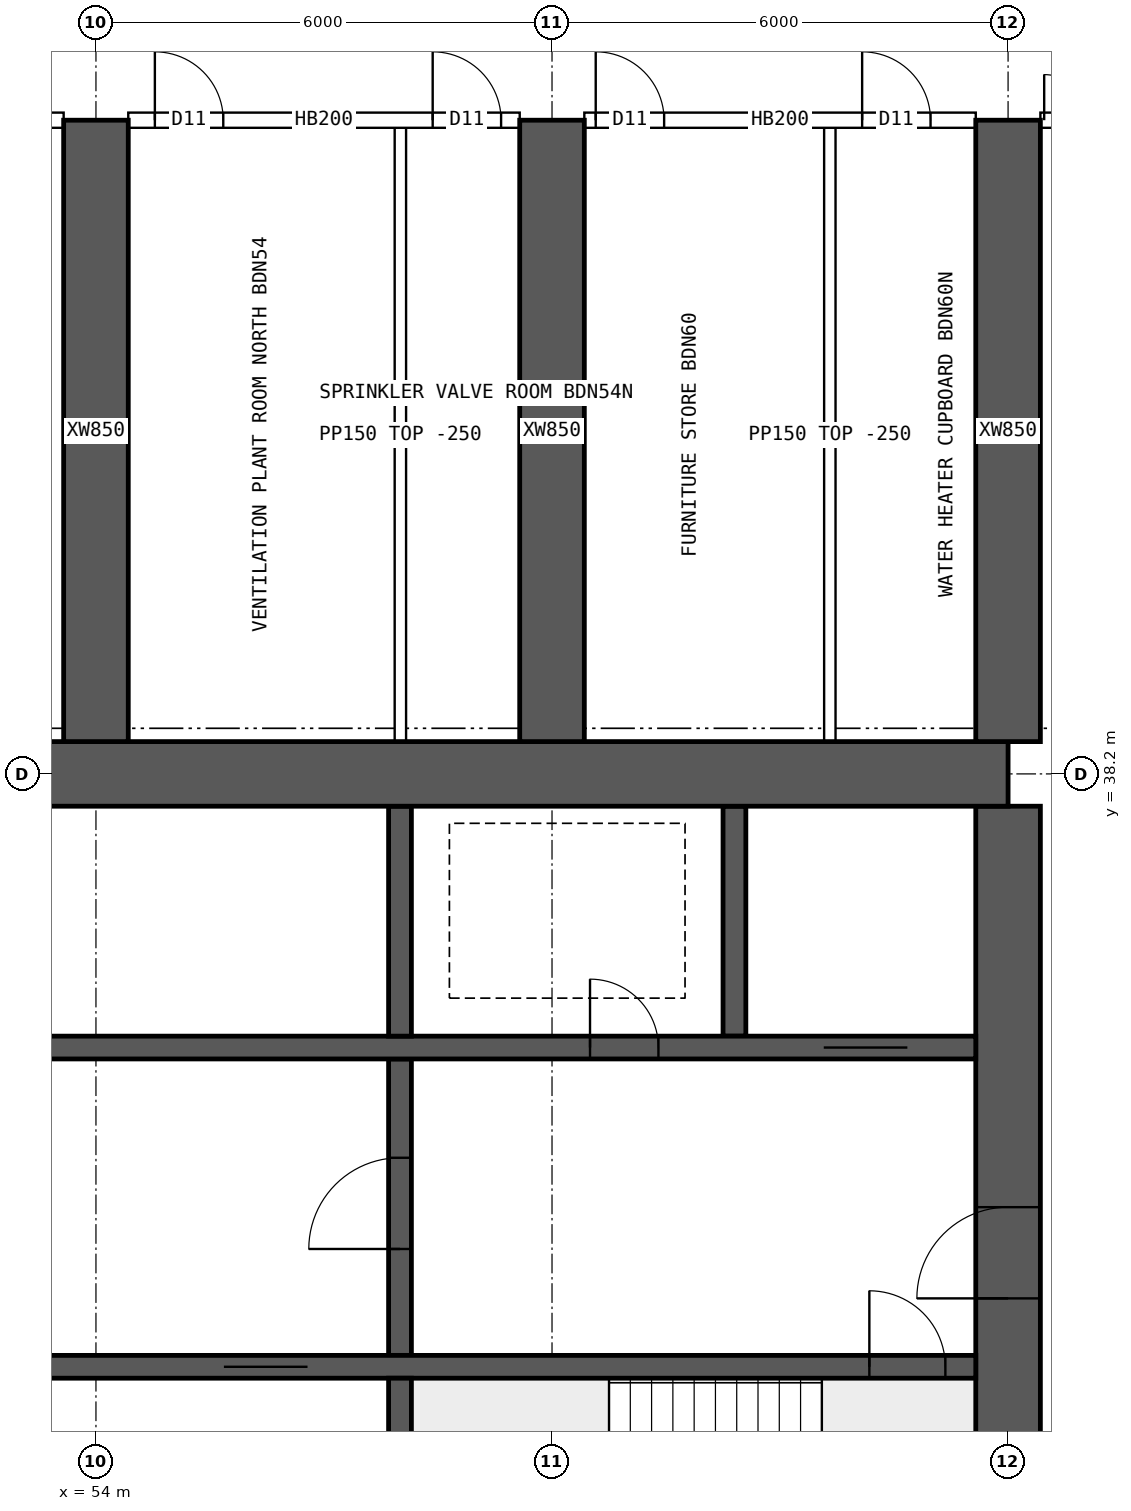
"""IFC4 building model, lengths in metres.
Left out: names, types, materials, properties, quantities, classifications, styles, units other than length and angle.
Written with IfcOpenShell. Run it as: python <this file> out.ifc"""

import sys

from ifc_helpers import new_model, si_unit, direction, frame, frame_2d, origin, place, context, subcontext, project, spatial, rectangle, extrude, element, fill, save


model = new_model("IFC4")
c1 = context("Model", 3, precision=1e-05, world=origin(), true_north=direction((0.0, 1.0)))
c2 = subcontext(c1, "Body", "Model", "MODEL_VIEW")
j1 = project(units=[si_unit("LENGTHUNIT", "METRE"), si_unit("PLANEANGLEUNIT", "RADIAN")], contexts=[c1])
p1 = place(None, origin())
s1 = spatial("IfcSite", under=j1, at=p1, CompositionType="ELEMENT")
p2 = place(p1, origin())
s2 = spatial("IfcBuilding", under=s1, at=p2, CompositionType="ELEMENT")
p3 = place(p2, frame((0.0, 0.0, 178.6)))
s3 = spatial("IfcBuildingStorey", under=s2, at=p3, CompositionType="ELEMENT", Elevation=178.6)
p4 = place(p3, frame((18.0, 38.2, 0.0), z_axis=(0.0, 0.0, 1.0), x_axis=(1.0, 0.0, 0.0)))
e1 = element("IfcWall", 1, at=p4, inside=s3, PredefinedType="SHEAR", context=c2, shape_type="SweptSolid", body=[
    extrude(rectangle(XDim=48.0, YDim=0.85, at=frame_2d((24.0, 0.0))), origin(), (0.0, 0.0, 1.0), 3.75),
])
p5 = place(p3, frame((66.0, 26.225, 0.0), z_axis=(0.0, 0.0, 1.0), x_axis=(0.0, 1.0, 0.0)))
e2 = element("IfcWall", 2, at=p5, inside=s3, PredefinedType="SHEAR", context=c2, shape_type="SweptSolid", body=[
    extrude(rectangle(XDim=11.55, YDim=0.85, at=frame_2d((5.775, 0.0))), origin(), (0.0, 0.0, 1.0), 3.75),
])
p6 = place(p5, frame((5.075, 0.0, 0.0)))
e3 = element("IfcOpeningElement", 3, at=p6, cuts=e2, PredefinedType="OPENING", context=c2, shape_type="SweptSolid", body=[
    extrude(rectangle(XDim=1.2, YDim=2.1, at=frame_2d((0.6, 1.05))), frame((0.0, 0.435, 0.0), z_axis=(0.0, -1.0, 0.0), x_axis=(1.0, 0.0, 0.0)), (0.0, 0.0, 1.0), 0.87),
])
p7 = place(p3, frame((18.425, 30.4, 0.0), z_axis=(0.0, 0.0, 1.0), x_axis=(1.0, 0.0, 0.0)))
e4 = element("IfcWall", 4, at=p7, inside=s3, PredefinedType="SHEAR", context=c2, shape_type="SweptSolid", body=[
    extrude(rectangle(XDim=47.15, YDim=0.3, at=frame_2d((23.575, 0.0))), origin(), (0.0, 0.0, 1.0), 3.75),
])
p8 = place(p7, frame((0.4, 0.0, 0.0)))
e5 = element("IfcOpeningElement", 5, at=p8, cuts=e4, PredefinedType="OPENING", context=c2, shape_type="SweptSolid", body=[
    extrude(rectangle(XDim=1.0, YDim=2.1, at=frame_2d((0.5, 1.05))), frame((0.0, 0.16, 0.0), z_axis=(0.0, -1.0, 0.0), x_axis=(1.0, 0.0, 0.0)), (0.0, 0.0, 1.0), 0.32),
])
p9 = place(p7, frame((45.75, 0.0, 0.0)))
e6 = element("IfcOpeningElement", 6, at=p9, cuts=e4, PredefinedType="OPENING", context=c2, shape_type="SweptSolid", body=[
    extrude(rectangle(XDim=1.0, YDim=2.1, at=frame_2d((0.5, 1.05))), frame((0.0, 0.16, 0.0), z_axis=(0.0, -1.0, 0.0), x_axis=(1.0, 0.0, 0.0)), (0.0, 0.0, 1.0), 0.32),
])
p10 = place(p7, frame((8.325, 0.0, 0.0)))
e7 = element("IfcOpeningElement", 7, at=p10, cuts=e4, PredefinedType="OPENING", context=c2, shape_type="SweptSolid", body=[
    extrude(rectangle(XDim=1.1, YDim=2.1, at=frame_2d((0.55, 1.05))), frame((0.0, 0.16, 0.0), z_axis=(0.0, -1.0, 0.0), x_axis=(1.0, 0.0, 0.0)), (0.0, 0.0, 1.0), 0.32),
])
p11 = place(p7, frame((10.925, 0.0, 0.0)))
e8 = element("IfcOpeningElement", 8, at=p11, cuts=e4, PredefinedType="OPENING", context=c2, shape_type="SweptSolid", body=[
    extrude(rectangle(XDim=1.1, YDim=2.1, at=frame_2d((0.55, 1.05))), frame((0.0, 0.16, 0.0), z_axis=(0.0, -1.0, 0.0), x_axis=(1.0, 0.0, 0.0)), (0.0, 0.0, 1.0), 0.32),
])
p12 = place(p7, frame((13.525, 0.0, 0.0)))
e9 = element("IfcOpeningElement", 9, at=p12, cuts=e4, PredefinedType="OPENING", context=c2, shape_type="SweptSolid", body=[
    extrude(rectangle(XDim=1.1, YDim=2.1, at=frame_2d((0.55, 1.05))), frame((0.0, 0.16, 0.0), z_axis=(0.0, -1.0, 0.0), x_axis=(1.0, 0.0, 0.0)), (0.0, 0.0, 1.0), 0.32),
])
p13 = place(p7, frame((16.125, 0.0, 0.0)))
e10 = element("IfcOpeningElement", 10, at=p13, cuts=e4, PredefinedType="OPENING", context=c2, shape_type="SweptSolid", body=[
    extrude(rectangle(XDim=1.1, YDim=2.1, at=frame_2d((0.55, 1.05))), frame((0.0, 0.16, 0.0), z_axis=(0.0, -1.0, 0.0), x_axis=(1.0, 0.0, 0.0)), (0.0, 0.0, 1.0), 0.32),
])
p14 = place(p7, frame((18.9, 0.0, 0.0)))
e11 = element("IfcOpeningElement", 11, at=p14, cuts=e4, PredefinedType="OPENING", context=c2, shape_type="SweptSolid", body=[
    extrude(rectangle(XDim=0.9, YDim=2.1, at=frame_2d((0.45, 1.05))), frame((0.0, 0.16, 0.0), z_axis=(0.0, -1.0, 0.0), x_axis=(1.0, 0.0, 0.0)), (0.0, 0.0, 1.0), 0.32),
])
p15 = place(p7, frame((30.192, 0.0, 0.0)))
e12 = element("IfcOpeningElement", 12, at=p15, cuts=e4, PredefinedType="OPENING", context=c2, shape_type="SweptSolid", body=[
    extrude(rectangle(XDim=1.1, YDim=2.1, at=frame_2d((0.55, 1.05))), frame((0.0, 0.16, 0.0), z_axis=(0.0, -1.0, 0.0), x_axis=(1.0, 0.0, 0.0)), (0.0, 0.0, 1.0), 0.32),
])
p16 = place(p7, frame((33.725, 0.0, 0.0)))
e13 = element("IfcOpeningElement", 13, at=p16, cuts=e4, PredefinedType="OPENING", context=c2, shape_type="SweptSolid", body=[
    extrude(rectangle(XDim=1.1, YDim=2.1, at=frame_2d((0.55, 1.05))), frame((0.0, 0.16, 0.0), z_axis=(0.0, -1.0, 0.0), x_axis=(1.0, 0.0, 0.0)), (0.0, 0.0, 1.0), 0.32),
])
p17 = place(p7, frame((37.258, 0.0, 0.0)))
e14 = element("IfcOpeningElement", 14, at=p17, cuts=e4, PredefinedType="OPENING", context=c2, shape_type="SweptSolid", body=[
    extrude(rectangle(XDim=1.1, YDim=2.1, at=frame_2d((0.55, 1.05))), frame((0.0, 0.16, 0.0), z_axis=(0.0, -1.0, 0.0), x_axis=(1.0, 0.0, 0.0)), (0.0, 0.0, 1.0), 0.32),
])
p18 = place(p3, frame((18.425, 34.6, 0.0), z_axis=(0.0, 0.0, 1.0), x_axis=(1.0, 0.0, 0.0)))
e15 = element("IfcWall", 15, at=p18, inside=s3, PredefinedType="SHEAR", context=c2, shape_type="SweptSolid", body=[
    extrude(rectangle(XDim=47.15, YDim=0.3, at=frame_2d((23.575, 0.0))), origin(), (0.0, 0.0, 1.0), 3.75),
])
p19 = place(p18, frame((0.9, 0.0, 0.0)))
e16 = element("IfcOpeningElement", 16, at=p19, cuts=e15, PredefinedType="OPENING", context=c2, shape_type="SweptSolid", body=[
    extrude(rectangle(XDim=1.1, YDim=2.1, at=frame_2d((0.55, 1.05))), frame((0.0, 0.16, 0.0), z_axis=(0.0, -1.0, 0.0), x_axis=(1.0, 0.0, 0.0)), (0.0, 0.0, 1.0), 0.32),
])
p20 = place(p18, frame((45.15, 0.0, 0.0)))
e17 = element("IfcOpeningElement", 17, at=p20, cuts=e15, PredefinedType="OPENING", context=c2, shape_type="SweptSolid", body=[
    extrude(rectangle(XDim=1.1, YDim=2.1, at=frame_2d((0.55, 1.05))), frame((0.0, 0.16, 0.0), z_axis=(0.0, -1.0, 0.0), x_axis=(1.0, 0.0, 0.0)), (0.0, 0.0, 1.0), 0.32),
])
p21 = place(p18, frame((4.175, 0.0, 0.0)))
e18 = element("IfcOpeningElement", 18, at=p21, cuts=e15, PredefinedType="OPENING", context=c2, shape_type="SweptSolid", body=[
    extrude(rectangle(XDim=0.9, YDim=2.1, at=frame_2d((0.45, 1.05))), frame((0.0, 0.16, 0.0), z_axis=(0.0, -1.0, 0.0), x_axis=(1.0, 0.0, 0.0)), (0.0, 0.0, 1.0), 0.32),
])
p22 = place(p18, frame((42.075, 0.0, 0.0)))
e19 = element("IfcOpeningElement", 19, at=p22, cuts=e15, PredefinedType="OPENING", context=c2, shape_type="SweptSolid", body=[
    extrude(rectangle(XDim=0.9, YDim=2.1, at=frame_2d((0.45, 1.05))), frame((0.0, 0.16, 0.0), z_axis=(0.0, -1.0, 0.0), x_axis=(1.0, 0.0, 0.0)), (0.0, 0.0, 1.0), 0.32),
])
p23 = place(p18, frame((8.95, 0.0, 0.0)))
e20 = element("IfcOpeningElement", 20, at=p23, cuts=e15, PredefinedType="OPENING", context=c2, shape_type="SweptSolid", body=[
    extrude(rectangle(XDim=0.9, YDim=2.1, at=frame_2d((0.45, 1.05))), frame((0.0, 0.16, 0.0), z_axis=(0.0, -1.0, 0.0), x_axis=(1.0, 0.0, 0.0)), (0.0, 0.0, 1.0), 0.32),
])
p24 = place(p18, frame((12.924, 0.0, 0.0)))
e21 = element("IfcOpeningElement", 21, at=p24, cuts=e15, PredefinedType="OPENING", context=c2, shape_type="SweptSolid", body=[
    extrude(rectangle(XDim=0.9, YDim=2.1, at=frame_2d((0.45, 1.05))), frame((0.0, 0.16, 0.0), z_axis=(0.0, -1.0, 0.0), x_axis=(1.0, 0.0, 0.0)), (0.0, 0.0, 1.0), 0.32),
])
p25 = place(p18, frame((16.571, 0.0, 0.0)))
e22 = element("IfcOpeningElement", 22, at=p25, cuts=e15, PredefinedType="OPENING", context=c2, shape_type="SweptSolid", body=[
    extrude(rectangle(XDim=0.9, YDim=2.1, at=frame_2d((0.45, 1.05))), frame((0.0, 0.16, 0.0), z_axis=(0.0, -1.0, 0.0), x_axis=(1.0, 0.0, 0.0)), (0.0, 0.0, 1.0), 0.32),
])
p26 = place(p18, frame((20.33, 0.0, 0.0)))
e23 = element("IfcOpeningElement", 23, at=p26, cuts=e15, PredefinedType="OPENING", context=c2, shape_type="SweptSolid", body=[
    extrude(rectangle(XDim=0.9, YDim=2.1, at=frame_2d((0.45, 1.05))), frame((0.0, 0.16, 0.0), z_axis=(0.0, -1.0, 0.0), x_axis=(1.0, 0.0, 0.0)), (0.0, 0.0, 1.0), 0.32),
])
p27 = place(p18, frame((24.736, 0.0, 0.0)))
e24 = element("IfcOpeningElement", 24, at=p27, cuts=e15, PredefinedType="OPENING", context=c2, shape_type="SweptSolid", body=[
    extrude(rectangle(XDim=0.9, YDim=2.1, at=frame_2d((0.45, 1.05))), frame((0.0, 0.16, 0.0), z_axis=(0.0, -1.0, 0.0), x_axis=(1.0, 0.0, 0.0)), (0.0, 0.0, 1.0), 0.32),
])
p28 = place(p18, frame((27.533, 0.0, 0.0)))
e25 = element("IfcOpeningElement", 25, at=p28, cuts=e15, PredefinedType="OPENING", context=c2, shape_type="SweptSolid", body=[
    extrude(rectangle(XDim=0.9, YDim=2.1, at=frame_2d((0.45, 1.05))), frame((0.0, 0.16, 0.0), z_axis=(0.0, -1.0, 0.0), x_axis=(1.0, 0.0, 0.0)), (0.0, 0.0, 1.0), 0.32),
])
p29 = place(p18, frame((33.654, 0.0, 0.0)))
e26 = element("IfcOpeningElement", 26, at=p29, cuts=e15, PredefinedType="OPENING", context=c2, shape_type="SweptSolid", body=[
    extrude(rectangle(XDim=0.9, YDim=2.1, at=frame_2d((0.45, 1.05))), frame((0.0, 0.16, 0.0), z_axis=(0.0, -1.0, 0.0), x_axis=(1.0, 0.0, 0.0)), (0.0, 0.0, 1.0), 0.32),
])
p30 = place(p3, frame((58.0, 26.225, 0.0), z_axis=(0.0, 0.0, 1.0), x_axis=(0.0, 1.0, 0.0)))
e27 = element("IfcWall", 27, at=p30, inside=s3, PredefinedType="SHEAR", context=c2, shape_type="SweptSolid", body=[
    extrude(rectangle(XDim=4.025, YDim=0.3, at=frame_2d((2.012, 0.0))), origin(), (0.0, 0.0, 1.0), 3.75),
])
p31 = place(p3, frame((58.0, 30.55, 0.0), z_axis=(0.0, 0.0, 1.0), x_axis=(0.0, 1.0, 0.0)))
e28 = element("IfcWall", 28, at=p31, inside=s3, PredefinedType="SHEAR", context=c2, shape_type="SweptSolid", body=[
    extrude(rectangle(XDim=3.9, YDim=0.3, at=frame_2d((1.95, 0.0))), origin(), (0.0, 0.0, 1.0), 3.75),
])
p32 = place(p31, frame((1.4, 0.0, 0.0)))
e29 = element("IfcOpeningElement", 29, at=p32, cuts=e28, PredefinedType="OPENING", context=c2, shape_type="SweptSolid", body=[
    extrude(rectangle(XDim=1.2, YDim=2.1, at=frame_2d((0.6, 1.05))), frame((0.0, 0.16, 0.0), z_axis=(0.0, -1.0, 0.0), x_axis=(1.0, 0.0, 0.0)), (0.0, 0.0, 1.0), 0.32),
])
for number, where, z_axis, x_axis in (
    (30, (62.4, 34.75, 0.0), (0.0, 0.0, 1.0), (0.0, 1.0, 0.0)),
    (31, (58.0, 34.75, 0.0), (0.0, 0.0, 1.0), (0.0, 1.0, 0.0)),
):
    element("IfcWall", number, at=place(p3, frame(where, z_axis=z_axis, x_axis=x_axis)), inside=s3, PredefinedType="SHEAR", context=c2, shape_type="SweptSolid", body=[
        extrude(rectangle(XDim=3.025, YDim=0.3, at=frame_2d((1.512, 0.0))), origin(), (0.0, 0.0, 1.0), 3.75),
    ])
for number, where, z_axis, x_axis in (
    (32, (54.0, 38.625, 0.0), (0.0, 0.0, 1.0), (0.0, 1.0, 0.0)),
    (33, (60.0, 38.625, 0.0), (0.0, 0.0, 1.0), (0.0, 1.0, 0.0)),
    (34, (66.0, 38.625, 0.0), (0.0, 0.0, 1.0), (0.0, 1.0, 0.0)),
):
    element("IfcWall", number, at=place(p3, frame(where, z_axis=z_axis, x_axis=x_axis)), inside=s3, PredefinedType="SHEAR", context=c2, shape_type="SweptSolid", body=[
        extrude(rectangle(XDim=8.175, YDim=0.85, at=frame_2d((4.087, 0.0))), origin(), (0.0, 0.0, 1.0), 3.75),
    ])
p33 = place(p3, frame((48.425, 46.8, 0.0), z_axis=(0.0, 0.0, 1.0), x_axis=(1.0, 0.0, 0.0)))
e35 = element("IfcWall", 35, at=p33, inside=s3, PredefinedType="SOLIDWALL", context=c2, shape_type="SweptSolid", body=[
    extrude(rectangle(XDim=5.15, YDim=0.2, at=frame_2d((2.575, 0.0))), origin(), (0.0, 0.0, 1.0), 3.5),
])
p34 = place(p33, frame((0.15, 0.0, 0.0)))
e36 = element("IfcOpeningElement", 36, at=p34, cuts=e35, PredefinedType="OPENING", context=c2, shape_type="SweptSolid", body=[
    extrude(rectangle(XDim=0.9, YDim=2.1, at=frame_2d((0.45, 1.05))), frame((0.0, 0.11, 0.0), z_axis=(0.0, -1.0, 0.0), x_axis=(1.0, 0.0, 0.0)), (0.0, 0.0, 1.0), 0.22),
])
p35 = place(p33, frame((2.005, 0.0, 0.0)))
e37 = element("IfcOpeningElement", 37, at=p35, cuts=e35, PredefinedType="OPENING", context=c2, shape_type="SweptSolid", body=[
    extrude(rectangle(XDim=0.9, YDim=2.1, at=frame_2d((0.45, 1.05))), frame((0.0, 0.11, 0.0), z_axis=(0.0, -1.0, 0.0), x_axis=(1.0, 0.0, 0.0)), (0.0, 0.0, 1.0), 0.22),
])
p36 = place(p3, frame((54.425, 46.8, 0.0), z_axis=(0.0, 0.0, 1.0), x_axis=(1.0, 0.0, 0.0)))
e38 = element("IfcWall", 38, at=p36, inside=s3, PredefinedType="SOLIDWALL", context=c2, shape_type="SweptSolid", body=[
    extrude(rectangle(XDim=5.15, YDim=0.2, at=frame_2d((2.575, 0.0))), origin(), (0.0, 0.0, 1.0), 3.5),
])
p37 = place(p36, frame((0.35, 0.0, 0.0)))
e39 = element("IfcOpeningElement", 39, at=p37, cuts=e38, PredefinedType="OPENING", context=c2, shape_type="SweptSolid", body=[
    extrude(rectangle(XDim=0.9, YDim=2.1, at=frame_2d((0.45, 1.05))), frame((0.0, 0.11, 0.0), z_axis=(0.0, -1.0, 0.0), x_axis=(1.0, 0.0, 0.0)), (0.0, 0.0, 1.0), 0.22),
])
p38 = place(p36, frame((4.005, 0.0, 0.0)))
e40 = element("IfcOpeningElement", 40, at=p38, cuts=e38, PredefinedType="OPENING", context=c2, shape_type="SweptSolid", body=[
    extrude(rectangle(XDim=0.9, YDim=2.1, at=frame_2d((0.45, 1.05))), frame((0.0, 0.11, 0.0), z_axis=(0.0, -1.0, 0.0), x_axis=(1.0, 0.0, 0.0)), (0.0, 0.0, 1.0), 0.22),
])
p39 = place(p3, frame((60.425, 46.8, 0.0), z_axis=(0.0, 0.0, 1.0), x_axis=(1.0, 0.0, 0.0)))
e41 = element("IfcWall", 41, at=p39, inside=s3, PredefinedType="SOLIDWALL", context=c2, shape_type="SweptSolid", body=[
    extrude(rectangle(XDim=5.15, YDim=0.2, at=frame_2d((2.575, 0.0))), origin(), (0.0, 0.0, 1.0), 3.5),
])
p40 = place(p39, frame((0.15, 0.0, 0.0)))
e42 = element("IfcOpeningElement", 42, at=p40, cuts=e41, PredefinedType="OPENING", context=c2, shape_type="SweptSolid", body=[
    extrude(rectangle(XDim=0.9, YDim=2.1, at=frame_2d((0.45, 1.05))), frame((0.0, 0.11, 0.0), z_axis=(0.0, -1.0, 0.0), x_axis=(1.0, 0.0, 0.0)), (0.0, 0.0, 1.0), 0.22),
])
p41 = place(p39, frame((3.655, 0.0, 0.0)))
e43 = element("IfcOpeningElement", 43, at=p41, cuts=e41, PredefinedType="OPENING", context=c2, shape_type="SweptSolid", body=[
    extrude(rectangle(XDim=0.9, YDim=2.1, at=frame_2d((0.45, 1.05))), frame((0.0, 0.11, 0.0), z_axis=(0.0, -1.0, 0.0), x_axis=(1.0, 0.0, 0.0)), (0.0, 0.0, 1.0), 0.22),
])
p42 = place(p3, frame((66.425, 46.8, 0.0), z_axis=(0.0, 0.0, 1.0), x_axis=(1.0, 0.0, 0.0)))
e44 = element("IfcWall", 44, at=p42, inside=s3, PredefinedType="SOLIDWALL", context=c2, shape_type="SweptSolid", body=[
    extrude(rectangle(XDim=1.975, YDim=0.2, at=frame_2d((0.987, 0.0))), origin(), (0.0, 0.0, 1.0), 3.5),
])
p43 = place(p42, frame((0.05, 0.0, 0.0)))
e45 = element("IfcOpeningElement", 45, at=p43, cuts=e44, PredefinedType="OPENING", context=c2, shape_type="SweptSolid", body=[
    extrude(rectangle(XDim=1.2, YDim=2.1, at=frame_2d((0.6, 1.05))), frame((0.0, 0.11, 0.0), z_axis=(0.0, -1.0, 0.0), x_axis=(1.0, 0.0, 0.0)), (0.0, 0.0, 1.0), 0.22),
])
for number, where, z_axis, x_axis in (
    (46, (58.005, 38.625, 0.0), (0.0, 0.0, 1.0), (0.0, 1.0, 0.0)),
    (47, (63.655, 38.625, 0.0), (0.0, 0.0, 1.0), (0.0, 1.0, 0.0)),
):
    element("IfcWall", number, at=place(p3, frame(where, z_axis=z_axis, x_axis=x_axis)), inside=s3, PredefinedType="PARTITIONING", context=c2, shape_type="SweptSolid", body=[
        extrude(rectangle(XDim=8.075, YDim=0.15, at=frame_2d((4.038, 0.0))), origin(), (0.0, 0.0, 1.0), 3.5),
    ])
p44 = place(p6, origin())
e48 = element("IfcDoor", 48, at=p44, inside=s3, OperationType="SINGLE_SWING_LEFT", PredefinedType="DOOR", context=c2, shape_type="SweptSolid", body=[
    extrude(rectangle(XDim=1.2, YDim=2.1, at=frame_2d((0.6, 1.05))), frame((0.0, 0.025, 0.0), z_axis=(0.0, -1.0, 0.0), x_axis=(1.0, 0.0, 0.0)), (0.0, 0.0, 1.0), 0.05),
])
fill(e3, e48)
p45 = place(p9, origin())
e49 = element("IfcDoor", 49, at=p45, inside=s3, OperationType="SINGLE_SWING_LEFT", PredefinedType="DOOR", context=c2, shape_type="SweptSolid", body=[
    extrude(rectangle(XDim=1.0, YDim=2.1, at=frame_2d((0.5, 1.05))), frame((0.0, 0.025, 0.0), z_axis=(0.0, -1.0, 0.0), x_axis=(1.0, 0.0, 0.0)), (0.0, 0.0, 1.0), 0.05),
])
fill(e6, e49)
p46 = place(p20, origin())
e50 = element("IfcDoor", 50, at=p46, inside=s3, OperationType="DOUBLE_DOOR_SLIDING", PredefinedType="DOOR", context=c2, shape_type="SweptSolid", body=[
    extrude(rectangle(XDim=1.1, YDim=2.1, at=frame_2d((0.55, 1.05))), frame((0.0, 0.025, 0.0), z_axis=(0.0, -1.0, 0.0), x_axis=(1.0, 0.0, 0.0)), (0.0, 0.0, 1.0), 0.05),
])
fill(e17, e50)
p47 = place(p22, origin())
e51 = element("IfcDoor", 51, at=p47, inside=s3, OperationType="SINGLE_SWING_LEFT", PredefinedType="DOOR", context=c2, shape_type="SweptSolid", body=[
    extrude(rectangle(XDim=0.9, YDim=2.1, at=frame_2d((0.45, 1.05))), frame((0.0, 0.025, 0.0), z_axis=(0.0, -1.0, 0.0), x_axis=(1.0, 0.0, 0.0)), (0.0, 0.0, 1.0), 0.05),
])
fill(e19, e51)
p48 = place(p32, origin())
e52 = element("IfcDoor", 52, at=p48, inside=s3, OperationType="SINGLE_SWING_LEFT", PredefinedType="DOOR", context=c2, shape_type="SweptSolid", body=[
    extrude(rectangle(XDim=1.2, YDim=2.1, at=frame_2d((0.6, 1.05))), frame((0.0, 0.025, 0.0), z_axis=(0.0, -1.0, 0.0), x_axis=(1.0, 0.0, 0.0)), (0.0, 0.0, 1.0), 0.05),
])
fill(e29, e52)
p49 = place(p17, origin())
e53 = element("IfcDoor", 53, at=p49, inside=s3, OperationType="DOUBLE_DOOR_SLIDING", PredefinedType="DOOR", context=c2, shape_type="SweptSolid", body=[
    extrude(rectangle(XDim=1.1, YDim=2.1, at=frame_2d((0.55, 1.05))), frame((0.0, 0.025, 0.0), z_axis=(0.0, -1.0, 0.0), x_axis=(1.0, 0.0, 0.0)), (0.0, 0.0, 1.0), 0.05),
])
fill(e14, e53)
p50 = place(p43, origin())
e54 = element("IfcDoor", 54, at=p50, inside=s3, OperationType="DOUBLE_DOOR_SINGLE_SWING", PredefinedType="DOOR", context=c2, shape_type="SweptSolid", body=[
    extrude(rectangle(XDim=1.2, YDim=2.1, at=frame_2d((0.6, 1.05))), frame((0.0, 0.025, 0.0), z_axis=(0.0, -1.0, 0.0), x_axis=(1.0, 0.0, 0.0)), (0.0, 0.0, 1.0), 0.05),
])
fill(e45, e54)
p51 = place(p37, origin())
e55 = element("IfcDoor", 55, at=p51, inside=s3, OperationType="SINGLE_SWING_LEFT", PredefinedType="DOOR", context=c2, shape_type="SweptSolid", body=[
    extrude(rectangle(XDim=0.9, YDim=2.1, at=frame_2d((0.45, 1.05))), frame((0.0, 0.025, 0.0), z_axis=(0.0, -1.0, 0.0), x_axis=(1.0, 0.0, 0.0)), (0.0, 0.0, 1.0), 0.05),
])
fill(e39, e55)
p52 = place(p38, origin())
e56 = element("IfcDoor", 56, at=p52, inside=s3, OperationType="SINGLE_SWING_LEFT", PredefinedType="DOOR", context=c2, shape_type="SweptSolid", body=[
    extrude(rectangle(XDim=0.9, YDim=2.1, at=frame_2d((0.45, 1.05))), frame((0.0, 0.025, 0.0), z_axis=(0.0, -1.0, 0.0), x_axis=(1.0, 0.0, 0.0)), (0.0, 0.0, 1.0), 0.05),
])
fill(e40, e56)
p53 = place(p40, origin())
e57 = element("IfcDoor", 57, at=p53, inside=s3, OperationType="SINGLE_SWING_LEFT", PredefinedType="DOOR", context=c2, shape_type="SweptSolid", body=[
    extrude(rectangle(XDim=0.9, YDim=2.1, at=frame_2d((0.45, 1.05))), frame((0.0, 0.025, 0.0), z_axis=(0.0, -1.0, 0.0), x_axis=(1.0, 0.0, 0.0)), (0.0, 0.0, 1.0), 0.05),
])
fill(e42, e57)
p54 = place(p41, origin())
e58 = element("IfcDoor", 58, at=p54, inside=s3, OperationType="SINGLE_SWING_LEFT", PredefinedType="DOOR", context=c2, shape_type="SweptSolid", body=[
    extrude(rectangle(XDim=0.9, YDim=2.1, at=frame_2d((0.45, 1.05))), frame((0.0, 0.025, 0.0), z_axis=(0.0, -1.0, 0.0), x_axis=(1.0, 0.0, 0.0)), (0.0, 0.0, 1.0), 0.05),
])
fill(e43, e58)
save(model, sys.argv[1])
